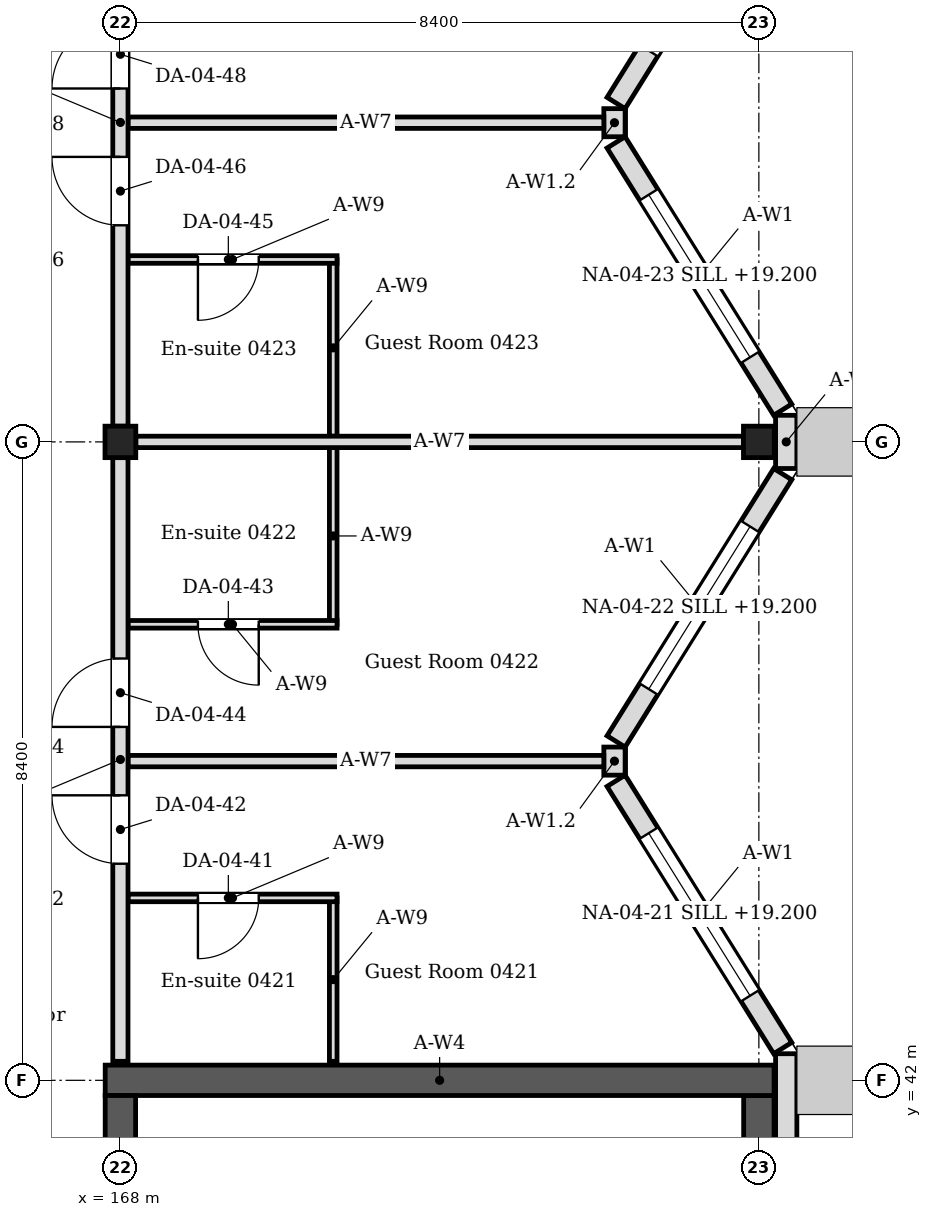
"""IFC4 building model, lengths in metres.
Left out: names, types, materials, properties, quantities, classifications, styles, units other than length and angle.
Written with IfcOpenShell. Run it as: python <this file> out.ifc"""

import sys

from ifc_helpers import new_model, si_unit, direction, frame, frame_2d, origin, origin_2d, place, context, subcontext, project, spatial, rectangle, i_section, extrude, element, fill, save


model = new_model("IFC4")
c1 = context("Model", 3, precision=1e-05, world=origin(), true_north=direction((0.0, 1.0)))
c2 = subcontext(c1, "Body", "Model", "MODEL_VIEW")
j1 = project(units=[si_unit("LENGTHUNIT", "METRE"), si_unit("PLANEANGLEUNIT", "RADIAN")], contexts=[c1])
p1 = place(None, origin())
s1 = spatial("IfcSite", under=j1, at=p1, CompositionType="ELEMENT")
p2 = place(p1, origin())
s2 = spatial("IfcBuilding", under=s1, at=p2, CompositionType="ELEMENT")
p3 = place(p2, frame((0.0, 0.0, 18.6)))
s3 = spatial("IfcBuildingStorey", under=s2, at=p3, CompositionType="ELEMENT", Elevation=18.6)
for number, where, z_axis, x_axis in (
    (1, (168.0, 50.4, 0.0), (0.0, 0.0, 1.0), (1.0, 0.0, 0.0)),
    (2, (176.4, 50.4, 0.0), (0.0, 0.0, 1.0), (1.0, 0.0, 0.0)),
):
    element("IfcColumn", number, at=place(p3, frame(where, z_axis=z_axis, x_axis=x_axis)), inside=s3, PredefinedType="COLUMN", context=c2, shape_type="SweptSolid", body=[
        extrude(i_section(OverallWidth=0.405, OverallDepth=0.414, WebThickness=0.018, FlangeThickness=0.028, FilletRadius=0.022, at=origin_2d()), origin(), (0.0, 0.0, 1.0), 4.2),
    ])
p4 = place(p3, frame((167.8, 42.0, 0.0), z_axis=(0.0, 0.0, 1.0), x_axis=(1.0, 0.0, 0.0)))
e3 = element("IfcWall", 3, at=p4, inside=s3, PredefinedType="SOLIDWALL", context=c2, shape_type="SweptSolid", body=[
    extrude(rectangle(XDim=8.8, YDim=0.4, at=frame_2d((4.4, 0.0))), origin(), (0.0, 0.0, 1.0), 4.05),
])
p5 = place(p3, frame((168.0, 25.4, 0.0), z_axis=(0.0, 0.0, 1.0), x_axis=(0.0, 1.0, 0.0)))
e4 = element("IfcWall", 4, at=p5, inside=s3, PredefinedType="SOLIDWALL", context=c2, shape_type="SweptSolid", body=[
    extrude(rectangle(XDim=16.4, YDim=0.4, at=frame_2d((8.2, 0.0))), origin(), (0.0, 0.0, 1.0), 4.05),
])
p6 = place(p5, frame((1.0, 0.0, 0.0)))
e5 = element("IfcOpeningElement", 5, at=p6, cuts=e4, PredefinedType="OPENING", context=c2, shape_type="SweptSolid", body=[
    extrude(rectangle(XDim=1.0, YDim=2.1, at=frame_2d((0.5, 1.05))), frame((0.0, 0.21, 0.0), z_axis=(0.0, -1.0, 0.0), x_axis=(1.0, 0.0, 0.0)), (0.0, 0.0, 1.0), 0.42),
])
p7 = place(p5, frame((14.4, 0.0, 0.0)))
e6 = element("IfcOpeningElement", 6, at=p7, cuts=e4, PredefinedType="OPENING", context=c2, shape_type="SweptSolid", body=[
    extrude(rectangle(XDim=1.4, YDim=2.1, at=frame_2d((0.7, 1.05))), frame((0.0, 0.21, 0.0), z_axis=(0.0, -1.0, 0.0), x_axis=(1.0, 0.0, 0.0)), (0.0, 0.0, 1.0), 0.42),
])
p8 = place(p3, frame((176.4, 25.4, 0.0), z_axis=(0.0, 0.0, 1.0), x_axis=(0.0, 1.0, 0.0)))
e7 = element("IfcWall", 7, at=p8, inside=s3, PredefinedType="SOLIDWALL", context=c2, shape_type="SweptSolid", body=[
    extrude(rectangle(XDim=16.4, YDim=0.4, at=frame_2d((8.2, 0.0))), origin(), (0.0, 0.0, 1.0), 4.05),
])
p9 = place(p3, frame((176.76, -0.22, 0.0), z_axis=(0.0, 0.0, 1.0), x_axis=(0.0, 1.0, 0.0)))
e8 = element("IfcWall", 8, at=p9, inside=s3, PredefinedType="SOLIDWALL", context=c2, shape_type="SweptSolid", body=[
    extrude(rectangle(XDim=42.57, YDim=0.28, at=frame_2d((21.285, 0.0))), origin(), (0.0, 0.0, 1.0), 4.05),
])
p10 = place(p9, frame((9.46, 0.0, 0.6)))
e9 = element("IfcOpeningElement", 9, at=p10, cuts=e8, PredefinedType="OPENING", context=c2, shape_type="SweptSolid", body=[
    extrude(rectangle(XDim=2.52, YDim=2.4, at=frame_2d((1.26, 1.2))), frame((0.0, 0.15, 0.0), z_axis=(0.0, -1.0, 0.0), x_axis=(1.0, 0.0, 0.0)), (0.0, 0.0, 1.0), 0.3),
])
p11 = place(p9, frame((13.66, 0.0, 0.6)))
e10 = element("IfcOpeningElement", 10, at=p11, cuts=e8, PredefinedType="OPENING", context=c2, shape_type="SweptSolid", body=[
    extrude(rectangle(XDim=2.52, YDim=2.4, at=frame_2d((1.26, 1.2))), frame((0.0, 0.15, 0.0), z_axis=(0.0, -1.0, 0.0), x_axis=(1.0, 0.0, 0.0)), (0.0, 0.0, 1.0), 0.3),
])
p12 = place(p9, frame((17.86, 0.0, 0.6)))
e11 = element("IfcOpeningElement", 11, at=p12, cuts=e8, PredefinedType="OPENING", context=c2, shape_type="SweptSolid", body=[
    extrude(rectangle(XDim=2.52, YDim=2.4, at=frame_2d((1.26, 1.2))), frame((0.0, 0.15, 0.0), z_axis=(0.0, -1.0, 0.0), x_axis=(1.0, 0.0, 0.0)), (0.0, 0.0, 1.0), 0.3),
])
p13 = place(p9, frame((22.06, 0.0, 0.6)))
e12 = element("IfcOpeningElement", 12, at=p13, cuts=e8, PredefinedType="OPENING", context=c2, shape_type="SweptSolid", body=[
    extrude(rectangle(XDim=2.52, YDim=2.4, at=frame_2d((1.26, 1.2))), frame((0.0, 0.15, 0.0), z_axis=(0.0, -1.0, 0.0), x_axis=(1.0, 0.0, 0.0)), (0.0, 0.0, 1.0), 0.3),
])
p14 = place(p3, frame((176.714, 42.424, 0.0), z_axis=(0.0, 0.0, 1.0), x_axis=(-0.529018946142, 0.848610013271, 0.0)))
e13 = element("IfcWall", 13, at=p14, inside=s3, PredefinedType="SOLIDWALL", context=c2, shape_type="SweptSolid", body=[
    extrude(rectangle(XDim=4.144, YDim=0.28, at=frame_2d((2.072, 0.0))), origin(), (0.0, 0.0, 1.0), 4.05),
])
p15 = place(p14, frame((0.812, 0.0, 0.6)))
e14 = element("IfcOpeningElement", 14, at=p15, cuts=e13, PredefinedType="OPENING", context=c2, shape_type="SweptSolid", body=[
    extrude(rectangle(XDim=2.52, YDim=2.4, at=frame_2d((1.26, 1.2))), frame((0.0, 0.15, 0.0), z_axis=(0.0, -1.0, 0.0), x_axis=(1.0, 0.0, 0.0)), (0.0, 0.0, 1.0), 0.3),
])
p16 = place(p3, frame((174.521, 46.459, 0.0), z_axis=(0.0, 0.0, 1.0), x_axis=(0.529018946142, 0.848610013271, 0.0)))
e15 = element("IfcWall", 15, at=p16, inside=s3, PredefinedType="SOLIDWALL", context=c2, shape_type="SweptSolid", body=[
    extrude(rectangle(XDim=4.144, YDim=0.28, at=frame_2d((2.072, 0.0))), origin(), (0.0, 0.0, 1.0), 4.05),
])
p17 = place(p16, frame((0.812, 0.0, 0.6)))
e16 = element("IfcOpeningElement", 16, at=p17, cuts=e15, PredefinedType="OPENING", context=c2, shape_type="SweptSolid", body=[
    extrude(rectangle(XDim=2.52, YDim=2.4, at=frame_2d((1.26, 1.2))), frame((0.0, 0.15, 0.0), z_axis=(0.0, -1.0, 0.0), x_axis=(1.0, 0.0, 0.0)), (0.0, 0.0, 1.0), 0.3),
])
p18 = place(p3, frame((174.5, 46.015, 0.0), z_axis=(0.0, 0.0, 1.0), x_axis=(0.0, 1.0, 0.0)))
e17 = element("IfcWall", 17, at=p18, inside=s3, PredefinedType="SOLIDWALL", context=c2, shape_type="SweptSolid", body=[
    extrude(rectangle(XDim=0.37, YDim=0.28, at=frame_2d((0.185, 0.0))), origin(), (0.0, 0.0, 1.0), 3.604),
])
p19 = place(p3, frame((176.76, 50.05, 0.0), z_axis=(0.0, 0.0, 1.0), x_axis=(0.0, 1.0, 0.0)))
e18 = element("IfcWall", 18, at=p19, inside=s3, PredefinedType="SOLIDWALL", context=c2, shape_type="SweptSolid", body=[
    extrude(rectangle(XDim=0.7, YDim=0.28, at=frame_2d((0.35, 0.0))), origin(), (0.0, 0.0, 1.0), 4.05),
])
p20 = place(p3, frame((176.714, 50.824, 0.0), z_axis=(0.0, 0.0, 1.0), x_axis=(-0.529018946142, 0.848610013271, 0.0)))
e19 = element("IfcWall", 19, at=p20, inside=s3, PredefinedType="SOLIDWALL", context=c2, shape_type="SweptSolid", body=[
    extrude(rectangle(XDim=4.144, YDim=0.28, at=frame_2d((2.072, 0.0))), origin(), (0.0, 0.0, 1.0), 4.05),
])
p21 = place(p20, frame((0.812, 0.0, 0.6)))
e20 = element("IfcOpeningElement", 20, at=p21, cuts=e19, PredefinedType="OPENING", context=c2, shape_type="SweptSolid", body=[
    extrude(rectangle(XDim=2.52, YDim=2.4, at=frame_2d((1.26, 1.2))), frame((0.0, 0.15, 0.0), z_axis=(0.0, -1.0, 0.0), x_axis=(1.0, 0.0, 0.0)), (0.0, 0.0, 1.0), 0.3),
])
p22 = place(p3, frame((174.521, 54.859, 0.0), z_axis=(0.0, 0.0, 1.0), x_axis=(0.528992500338, 0.848626498871, 0.0)))
e21 = element("IfcWall", 21, at=p22, inside=s3, PredefinedType="SOLIDWALL", context=c2, shape_type="SweptSolid", body=[
    extrude(rectangle(XDim=4.145, YDim=0.28, at=frame_2d((2.072, 0.0))), origin(), (0.0, 0.0, 1.0), 4.05),
])
p23 = place(p22, frame((0.812, 0.0, 0.6)))
e22 = element("IfcOpeningElement", 22, at=p23, cuts=e21, PredefinedType="OPENING", context=c2, shape_type="SweptSolid", body=[
    extrude(rectangle(XDim=2.52, YDim=2.4, at=frame_2d((1.26, 1.2))), frame((0.0, 0.15, 0.0), z_axis=(0.0, -1.0, 0.0), x_axis=(1.0, 0.0, 0.0)), (0.0, 0.0, 1.0), 0.3),
])
p24 = place(p3, frame((174.5, 54.415, 0.0), z_axis=(0.0, 0.0, 1.0), x_axis=(0.0, 1.0, 0.0)))
e23 = element("IfcWall", 23, at=p24, inside=s3, PredefinedType="SOLIDWALL", context=c2, shape_type="SweptSolid", body=[
    extrude(rectangle(XDim=0.37, YDim=0.28, at=frame_2d((0.185, 0.0))), origin(), (0.0, 0.0, 1.0), 3.604),
])
p25 = place(p3, frame((170.8, 42.25, 0.0), z_axis=(0.0, 0.0, 1.0), x_axis=(0.0, 1.0, 0.0)))
e24 = element("IfcWall", 24, at=p25, inside=s3, PredefinedType="PARTITIONING", context=c2, shape_type="SweptSolid", body=[
    extrude(rectangle(XDim=2.15, YDim=0.1, at=frame_2d((1.075, 0.0))), origin(), (0.0, 0.0, 1.0), 4.05),
])
p26 = place(p3, frame((170.85, 44.4, 0.0), z_axis=(0.0, 0.0, 1.0), x_axis=(-1.0, 0.0, 0.0)))
e25 = element("IfcWall", 25, at=p26, inside=s3, PredefinedType="PARTITIONING", context=c2, shape_type="SweptSolid", body=[
    extrude(rectangle(XDim=2.75, YDim=0.1, at=frame_2d((1.375, 0.0))), origin(), (0.0, 0.0, 1.0), 4.05),
])
p27 = place(p26, frame((1.03, 0.0, 0.0)))
e26 = element("IfcOpeningElement", 26, at=p27, cuts=e25, PredefinedType="OPENING", context=c2, shape_type="SweptSolid", body=[
    extrude(rectangle(XDim=0.8, YDim=2.1, at=frame_2d((0.4, 1.05))), frame((0.0, 0.06, 0.0), z_axis=(0.0, -1.0, 0.0), x_axis=(1.0, 0.0, 0.0)), (0.0, 0.0, 1.0), 0.12),
])
p28 = place(p3, frame((170.8, 48.0, 0.0), z_axis=(0.0, 0.0, 1.0), x_axis=(0.0, 1.0, 0.0)))
e27 = element("IfcWall", 27, at=p28, inside=s3, PredefinedType="PARTITIONING", context=c2, shape_type="SweptSolid", body=[
    extrude(rectangle(XDim=2.325, YDim=0.1, at=frame_2d((1.163, 0.0))), origin(), (0.0, 0.0, 1.0), 4.05),
])
p29 = place(p3, frame((170.85, 48.0, 0.0), z_axis=(0.0, 0.0, 1.0), x_axis=(-1.0, 0.0, 0.0)))
e28 = element("IfcWall", 28, at=p29, inside=s3, PredefinedType="PARTITIONING", context=c2, shape_type="SweptSolid", body=[
    extrude(rectangle(XDim=2.75, YDim=0.1, at=frame_2d((1.375, 0.0))), origin(), (0.0, 0.0, 1.0), 4.05),
])
p30 = place(p29, frame((1.03, 0.0, 0.0)))
e29 = element("IfcOpeningElement", 29, at=p30, cuts=e28, PredefinedType="OPENING", context=c2, shape_type="SweptSolid", body=[
    extrude(rectangle(XDim=0.8, YDim=2.1, at=frame_2d((0.4, 1.05))), frame((0.0, 0.06, 0.0), z_axis=(0.0, -1.0, 0.0), x_axis=(1.0, 0.0, 0.0)), (0.0, 0.0, 1.0), 0.12),
])
p31 = place(p3, frame((170.8, 50.475, 0.0), z_axis=(0.0, 0.0, 1.0), x_axis=(0.0, 1.0, 0.0)))
e30 = element("IfcWall", 30, at=p31, inside=s3, PredefinedType="PARTITIONING", context=c2, shape_type="SweptSolid", body=[
    extrude(rectangle(XDim=2.325, YDim=0.1, at=frame_2d((1.163, 0.0))), origin(), (0.0, 0.0, 1.0), 4.05),
])
p32 = place(p3, frame((170.85, 52.8, 0.0), z_axis=(0.0, 0.0, 1.0), x_axis=(-1.0, 0.0, 0.0)))
e31 = element("IfcWall", 31, at=p32, inside=s3, PredefinedType="PARTITIONING", context=c2, shape_type="SweptSolid", body=[
    extrude(rectangle(XDim=2.75, YDim=0.1, at=frame_2d((1.375, 0.0))), origin(), (0.0, 0.0, 1.0), 4.05),
])
p33 = place(p32, frame((1.03, 0.0, 0.0)))
e32 = element("IfcOpeningElement", 32, at=p33, cuts=e31, PredefinedType="OPENING", context=c2, shape_type="SweptSolid", body=[
    extrude(rectangle(XDim=0.8, YDim=2.1, at=frame_2d((0.4, 1.05))), frame((0.0, 0.06, 0.0), z_axis=(0.0, -1.0, 0.0), x_axis=(1.0, 0.0, 0.0)), (0.0, 0.0, 1.0), 0.12),
])
p34 = place(p3, frame((168.202, 50.4, 0.0), z_axis=(0.0, 0.0, 1.0), x_axis=(1.0, 0.0, 0.0)))
e33 = element("IfcWall", 33, at=p34, inside=s3, PredefinedType="PARTITIONING", context=c2, shape_type="SweptSolid", body=[
    extrude(rectangle(XDim=7.995, YDim=0.15, at=frame_2d((3.998, 0.0))), origin(), (0.0, 0.0, 1.0), 3.604),
])
for number, where, z_axis, x_axis in (
    (34, (168.1, 46.2, 0.0), (0.0, 0.0, 1.0), (1.0, 0.0, 0.0)),
    (35, (168.1, 54.6, 0.0), (0.0, 0.0, 1.0), (1.0, 0.0, 0.0)),
):
    element("IfcWall", number, at=place(p3, frame(where, z_axis=z_axis, x_axis=x_axis)), inside=s3, PredefinedType="PARTITIONING", context=c2, shape_type="SweptSolid", body=[
        extrude(rectangle(XDim=6.26, YDim=0.15, at=frame_2d((3.13, 0.0))), origin(), (0.0, 0.0, 1.0), 3.604),
    ])
p35 = place(p3, frame((168.0, 42.25, 0.0), z_axis=(0.0, 0.0, 1.0), x_axis=(0.0, 1.0, 0.0)))
e36 = element("IfcWall", 36, at=p35, inside=s3, PredefinedType="PARTITIONING", context=c2, shape_type="SweptSolid", body=[
    extrude(rectangle(XDim=7.943, YDim=0.2, at=frame_2d((3.972, 0.0))), origin(), (0.0, 0.0, 1.0), 3.45),
])
p36 = place(p35, frame((2.6, 0.0, 0.0)))
e37 = element("IfcOpeningElement", 37, at=p36, cuts=e36, PredefinedType="OPENING", context=c2, shape_type="SweptSolid", body=[
    extrude(rectangle(XDim=0.9, YDim=2.1, at=frame_2d((0.45, 1.05))), frame((0.0, 0.11, 0.0), z_axis=(0.0, -1.0, 0.0), x_axis=(1.0, 0.0, 0.0)), (0.0, 0.0, 1.0), 0.22),
])
p37 = place(p35, frame((4.4, 0.0, 0.0)))
e38 = element("IfcOpeningElement", 38, at=p37, cuts=e36, PredefinedType="OPENING", context=c2, shape_type="SweptSolid", body=[
    extrude(rectangle(XDim=0.9, YDim=2.1, at=frame_2d((0.45, 1.05))), frame((0.0, 0.11, 0.0), z_axis=(0.0, -1.0, 0.0), x_axis=(1.0, 0.0, 0.0)), (0.0, 0.0, 1.0), 0.22),
])
p38 = place(p3, frame((168.0, 50.607, 0.0), z_axis=(0.0, 0.0, 1.0), x_axis=(0.0, 1.0, 0.0)))
e39 = element("IfcWall", 39, at=p38, inside=s3, PredefinedType="PARTITIONING", context=c2, shape_type="SweptSolid", body=[
    extrude(rectangle(XDim=7.993, YDim=0.2, at=frame_2d((3.997, 0.0))), origin(), (0.0, 0.0, 1.0), 3.45),
])
p39 = place(p38, frame((2.643, 0.0, 0.0)))
e40 = element("IfcOpeningElement", 40, at=p39, cuts=e39, PredefinedType="OPENING", context=c2, shape_type="SweptSolid", body=[
    extrude(rectangle(XDim=0.9, YDim=2.1, at=frame_2d((0.45, 1.05))), frame((0.0, 0.11, 0.0), z_axis=(0.0, -1.0, 0.0), x_axis=(1.0, 0.0, 0.0)), (0.0, 0.0, 1.0), 0.22),
])
p40 = place(p38, frame((4.443, 0.0, 0.0)))
e41 = element("IfcOpeningElement", 41, at=p40, cuts=e39, PredefinedType="OPENING", context=c2, shape_type="SweptSolid", body=[
    extrude(rectangle(XDim=0.9, YDim=2.1, at=frame_2d((0.45, 1.05))), frame((0.0, 0.11, 0.0), z_axis=(0.0, -1.0, 0.0), x_axis=(1.0, 0.0, 0.0)), (0.0, 0.0, 1.0), 0.22),
])
p41 = place(p15, origin())
e42 = element("IfcWindow", 42, at=p41, inside=s3, PartitioningType="SINGLE_PANEL", PredefinedType="WINDOW", context=c2, shape_type="SweptSolid", body=[
    extrude(rectangle(XDim=2.52, YDim=2.4, at=frame_2d((1.26, 1.2))), frame((0.0, 0.03, 0.0), z_axis=(0.0, -1.0, 0.0), x_axis=(1.0, 0.0, 0.0)), (0.0, 0.0, 1.0), 0.06),
])
fill(e14, e42)
p42 = place(p17, origin())
e43 = element("IfcWindow", 43, at=p42, inside=s3, PartitioningType="SINGLE_PANEL", PredefinedType="WINDOW", context=c2, shape_type="SweptSolid", body=[
    extrude(rectangle(XDim=2.52, YDim=2.4, at=frame_2d((1.26, 1.2))), frame((0.0, 0.03, 0.0), z_axis=(0.0, -1.0, 0.0), x_axis=(1.0, 0.0, 0.0)), (0.0, 0.0, 1.0), 0.06),
])
fill(e16, e43)
p43 = place(p21, origin())
e44 = element("IfcWindow", 44, at=p43, inside=s3, PartitioningType="SINGLE_PANEL", PredefinedType="WINDOW", context=c2, shape_type="SweptSolid", body=[
    extrude(rectangle(XDim=2.52, YDim=2.4, at=frame_2d((1.26, 1.2))), frame((0.0, 0.03, 0.0), z_axis=(0.0, -1.0, 0.0), x_axis=(1.0, 0.0, 0.0)), (0.0, 0.0, 1.0), 0.06),
])
fill(e20, e44)
p44 = place(p27, origin())
e45 = element("IfcDoor", 45, at=p44, inside=s3, OperationType="SINGLE_SWING_RIGHT", PredefinedType="DOOR", context=c2, shape_type="SweptSolid", body=[
    extrude(rectangle(XDim=0.8, YDim=2.1, at=frame_2d((0.4, 1.05))), frame((0.0, 0.025, 0.0), z_axis=(0.0, -1.0, 0.0), x_axis=(1.0, 0.0, 0.0)), (0.0, 0.0, 1.0), 0.05),
])
fill(e26, e45)
p45 = place(p36, origin())
e46 = element("IfcDoor", 46, at=p45, inside=s3, OperationType="SINGLE_SWING_RIGHT", PredefinedType="DOOR", context=c2, shape_type="SweptSolid", body=[
    extrude(rectangle(XDim=0.9, YDim=2.1, at=frame_2d((0.45, 1.05))), frame((0.0, 0.025, 0.0), z_axis=(0.0, -1.0, 0.0), x_axis=(1.0, 0.0, 0.0)), (0.0, 0.0, 1.0), 0.05),
])
fill(e37, e46)
p46 = place(p30, origin())
e47 = element("IfcDoor", 47, at=p46, inside=s3, OperationType="SINGLE_SWING_LEFT", PredefinedType="DOOR", context=c2, shape_type="SweptSolid", body=[
    extrude(rectangle(XDim=0.8, YDim=2.1, at=frame_2d((0.4, 1.05))), frame((0.0, 0.025, 0.0), z_axis=(0.0, -1.0, 0.0), x_axis=(1.0, 0.0, 0.0)), (0.0, 0.0, 1.0), 0.05),
])
fill(e29, e47)
p47 = place(p37, origin())
e48 = element("IfcDoor", 48, at=p47, inside=s3, OperationType="SINGLE_SWING_LEFT", PredefinedType="DOOR", context=c2, shape_type="SweptSolid", body=[
    extrude(rectangle(XDim=0.9, YDim=2.1, at=frame_2d((0.45, 1.05))), frame((0.0, 0.025, 0.0), z_axis=(0.0, -1.0, 0.0), x_axis=(1.0, 0.0, 0.0)), (0.0, 0.0, 1.0), 0.05),
])
fill(e38, e48)
p48 = place(p33, origin())
e49 = element("IfcDoor", 49, at=p48, inside=s3, OperationType="SINGLE_SWING_RIGHT", PredefinedType="DOOR", context=c2, shape_type="SweptSolid", body=[
    extrude(rectangle(XDim=0.8, YDim=2.1, at=frame_2d((0.4, 1.05))), frame((0.0, 0.025, 0.0), z_axis=(0.0, -1.0, 0.0), x_axis=(1.0, 0.0, 0.0)), (0.0, 0.0, 1.0), 0.05),
])
fill(e32, e49)
p49 = place(p39, origin())
e50 = element("IfcDoor", 50, at=p49, inside=s3, OperationType="SINGLE_SWING_RIGHT", PredefinedType="DOOR", context=c2, shape_type="SweptSolid", body=[
    extrude(rectangle(XDim=0.9, YDim=2.1, at=frame_2d((0.45, 1.05))), frame((0.0, 0.025, 0.0), z_axis=(0.0, -1.0, 0.0), x_axis=(1.0, 0.0, 0.0)), (0.0, 0.0, 1.0), 0.05),
])
fill(e40, e50)
p50 = place(p40, origin())
e51 = element("IfcDoor", 51, at=p50, inside=s3, OperationType="SINGLE_SWING_LEFT", PredefinedType="DOOR", context=c2, shape_type="SweptSolid", body=[
    extrude(rectangle(XDim=0.9, YDim=2.1, at=frame_2d((0.45, 1.05))), frame((0.0, 0.025, 0.0), z_axis=(0.0, -1.0, 0.0), x_axis=(1.0, 0.0, 0.0)), (0.0, 0.0, 1.0), 0.05),
])
fill(e41, e51)
save(model, sys.argv[1])
